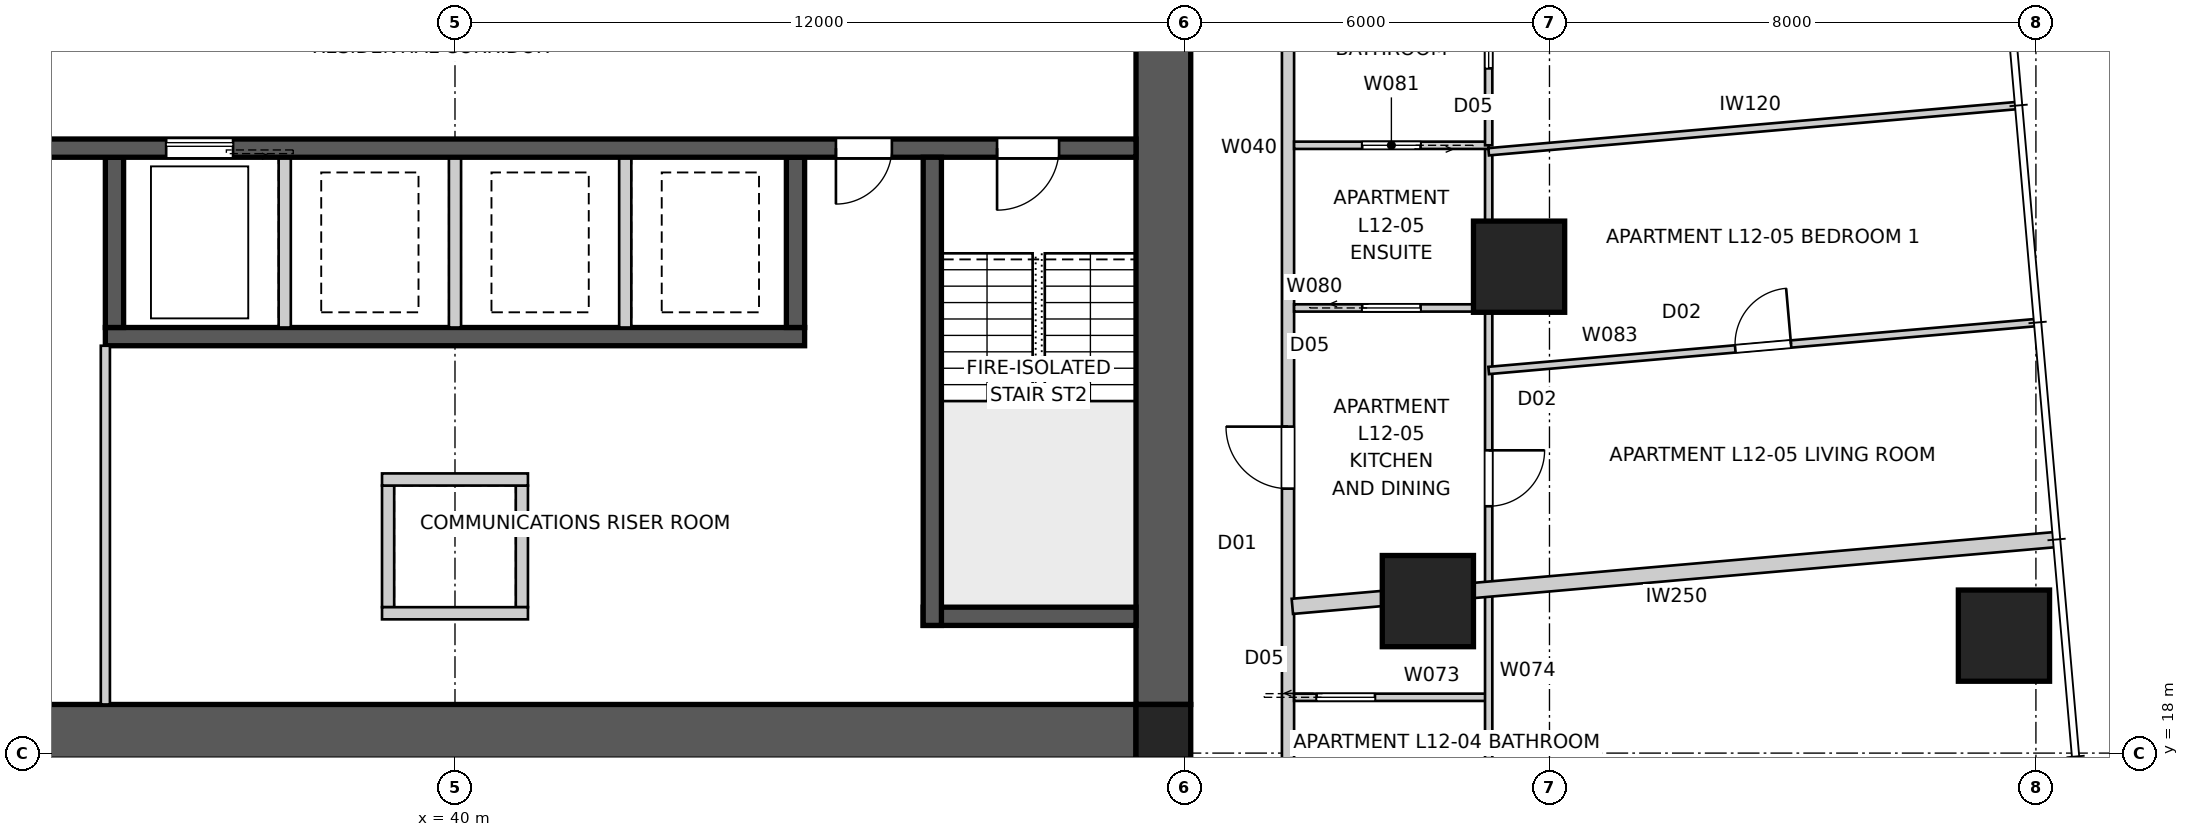
"""IFC4 building model, lengths in metres.
Left out: names, types, materials, properties, quantities, classifications, styles, units other than length and angle.
Written with IfcOpenShell. Run it as: python <this file> out.ifc"""

import sys

from ifc_helpers import new_model, si_unit, direction, frame, frame_2d, origin, origin_2d, place, context, subcontext, project, spatial, polyline, rectangle, outline, extrude, element, fill, save


model = new_model("IFC4")
c1 = context("Model", 3, precision=1e-05, world=origin(), true_north=direction((0.0, 1.0)))
c2 = subcontext(c1, "Body", "Model", "MODEL_VIEW")
j1 = project(units=[si_unit("LENGTHUNIT", "METRE"), si_unit("PLANEANGLEUNIT", "RADIAN")], contexts=[c1])
p1 = place(None, origin())
s1 = spatial("IfcSite", under=j1, at=p1, CompositionType="ELEMENT")
p2 = place(p1, origin())
s2 = spatial("IfcBuilding", under=s1, at=p2, CompositionType="ELEMENT")
p3 = place(p2, frame((0.0, 0.0, 47.2)))
s3 = spatial("IfcBuildingStorey", under=s2, at=p3, CompositionType="ELEMENT", Elevation=47.2)
p4 = place(p3, frame((51.2, 18.35, 0.0), z_axis=(0.0, 0.0, 1.0), x_axis=(-1.0, 0.0, 0.0)))
e1 = element("IfcWall", 1, at=p4, inside=s3, PredefinedType="SHEAR", context=c2, shape_type="SweptSolid", body=[
    extrude(outline(polyline([(0.0, -0.45), (22.4, -0.45), (22.4, -0.025), (22.85, -0.025), (22.85, 0.025), (22.4, 0.025), (22.4, 0.45), (0.0, 0.45), (0.0, 0.025), (-0.45, 0.025), (-0.45, -0.025), (0.0, -0.025), (0.0, -0.45)])), origin(), (0.0, 0.0, 1.0), 3.4),
])
p5 = place(p3, frame((51.65, 18.8, 0.0), z_axis=(0.0, 0.0, 1.0), x_axis=(0.0, 1.0, 0.0)))
e2 = element("IfcWall", 2, at=p5, inside=s3, PredefinedType="SHEAR", context=c2, shape_type="SweptSolid", body=[
    extrude(outline(polyline([(0.0, -0.45), (22.4, -0.45), (22.4, -0.025), (22.85, -0.025), (22.85, 0.025), (22.4, 0.025), (22.4, 0.45), (0.0, 0.45), (0.0, 0.025), (-0.45, 0.025), (-0.45, -0.025), (0.0, -0.025), (0.0, -0.45)])), origin(), (0.0, 0.0, 1.0), 3.4),
])
p6 = place(p5, frame((11.14, 0.0, 0.0)))
e3 = element("IfcOpeningElement", 3, at=p6, cuts=e2, PredefinedType="OPENING", context=c2, shape_type="SweptSolid", body=[
    extrude(rectangle(XDim=1.02, YDim=2.4, at=frame_2d((0.51, 1.2))), frame((0.0, 0.46, 0.0), z_axis=(0.0, -1.0, 0.0), x_axis=(1.0, 0.0, 0.0)), (0.0, 0.0, 1.0), 0.92),
])
p7 = place(p3, frame((51.2, 27.95, 0.0), z_axis=(0.0, 0.0, 1.0), x_axis=(-1.0, 0.0, 0.0)))
e4 = element("IfcWall", 4, at=p7, inside=s3, PredefinedType="SHEAR", context=c2, shape_type="SweptSolid", body=[
    extrude(rectangle(XDim=22.4, YDim=0.3, at=frame_2d((11.2, 0.0))), origin(), (0.0, 0.0, 1.0), 3.4),
])
p8 = place(p7, frame((19.04, 0.0, 0.0)))
e5 = element("IfcOpeningElement", 5, at=p8, cuts=e4, PredefinedType="OPENING", context=c2, shape_type="SweptSolid", body=[
    extrude(rectangle(XDim=0.92, YDim=2.1, at=frame_2d((0.46, 1.05))), frame((0.0, 0.16, 0.0), z_axis=(0.0, -1.0, 0.0), x_axis=(1.0, 0.0, 0.0)), (0.0, 0.0, 1.0), 0.32),
])
p9 = place(p7, frame((1.265, 0.0, 0.0)))
e6 = element("IfcOpeningElement", 6, at=p9, cuts=e4, PredefinedType="OPENING", context=c2, shape_type="SweptSolid", body=[
    extrude(rectangle(XDim=1.02, YDim=2.1, at=frame_2d((0.51, 1.05))), frame((0.0, 0.16, 0.0), z_axis=(0.0, -1.0, 0.0), x_axis=(1.0, 0.0, 0.0)), (0.0, 0.0, 1.0), 0.32),
])
p10 = place(p7, frame((4.015, 0.0, 0.0)))
e7 = element("IfcOpeningElement", 7, at=p10, cuts=e4, PredefinedType="OPENING", context=c2, shape_type="SweptSolid", body=[
    extrude(rectangle(XDim=0.92, YDim=2.1, at=frame_2d((0.46, 1.05))), frame((0.0, 0.16, 0.0), z_axis=(0.0, -1.0, 0.0), x_axis=(1.0, 0.0, 0.0)), (0.0, 0.0, 1.0), 0.32),
])
p11 = place(p7, frame((14.85, 0.0, 0.0)))
e8 = element("IfcOpeningElement", 8, at=p11, cuts=e4, PredefinedType="OPENING", context=c2, shape_type="SweptSolid", body=[
    extrude(rectangle(XDim=1.1, YDim=2.1, at=frame_2d((0.55, 1.05))), frame((0.0, 0.16, 0.0), z_axis=(0.0, -1.0, 0.0), x_axis=(1.0, 0.0, 0.0)), (0.0, 0.0, 1.0), 0.32),
])
p12 = place(p3, frame((45.75, 24.85, 0.0), z_axis=(0.0, 0.0, 1.0), x_axis=(-1.0, 0.0, 0.0)))
e9 = element("IfcWall", 9, at=p12, inside=s3, PredefinedType="SHEAR", context=c2, shape_type="SweptSolid", body=[
    extrude(rectangle(XDim=11.5, YDim=0.3, at=frame_2d((5.75, 0.0))), origin(), (0.0, 0.0, 1.0), 3.4),
])
p13 = place(p3, frame((45.6, 27.8, 0.0), z_axis=(0.0, 0.0, 1.0), x_axis=(0.0, -1.0, 0.0)))
e10 = element("IfcWall", 10, at=p13, inside=s3, PredefinedType="SHEAR", context=c2, shape_type="SweptSolid", body=[
    extrude(rectangle(XDim=2.8, YDim=0.3, at=frame_2d((1.4, 0.0))), origin(), (0.0, 0.0, 1.0), 3.4),
])
for number, where, z_axis, x_axis in (
    (11, (42.8, 27.8, 0.0), (0.0, 0.0, 1.0), (0.0, -1.0, 0.0)),
    (12, (40.0, 27.8, 0.0), (0.0, 0.0, 1.0), (0.0, -1.0, 0.0)),
    (13, (37.2, 27.8, 0.0), (0.0, 0.0, 1.0), (0.0, -1.0, 0.0)),
):
    element("IfcWall", number, at=place(p3, frame(where, z_axis=z_axis, x_axis=x_axis)), inside=s3, PredefinedType="SOLIDWALL", context=c2, shape_type="SweptSolid", body=[
        extrude(rectangle(XDim=2.8, YDim=0.2, at=frame_2d((1.4, 0.0))), origin(), (0.0, 0.0, 1.0), 3.4),
    ])
p14 = place(p3, frame((34.4, 27.8, 0.0), z_axis=(0.0, 0.0, 1.0), x_axis=(0.0, -1.0, 0.0)))
e14 = element("IfcWall", 14, at=p14, inside=s3, PredefinedType="SHEAR", context=c2, shape_type="SweptSolid", body=[
    extrude(rectangle(XDim=2.8, YDim=0.3, at=frame_2d((1.4, 0.0))), origin(), (0.0, 0.0, 1.0), 3.4),
])
p15 = place(p3, frame((47.85, 27.8, 0.0), z_axis=(0.0, 0.0, 1.0), x_axis=(0.0, -1.0, 0.0)))
e15 = element("IfcWall", 15, at=p15, inside=s3, PredefinedType="SHEAR", context=c2, shape_type="SweptSolid", body=[
    extrude(rectangle(XDim=7.7, YDim=0.3, at=frame_2d((3.85, 0.0))), origin(), (0.0, 0.0, 1.0), 3.4),
])
p16 = place(p3, frame((51.2, 20.25, 0.0), z_axis=(0.0, 0.0, 1.0), x_axis=(-1.0, 0.0, 0.0)))
e16 = element("IfcWall", 16, at=p16, inside=s3, PredefinedType="SHEAR", context=c2, shape_type="SweptSolid", body=[
    extrude(rectangle(XDim=3.5, YDim=0.3, at=frame_2d((1.75, 0.0))), origin(), (0.0, 0.0, 1.0), 3.4),
])
for number, where, z_axis, x_axis in (
    (17, (38.9, 22.4, 0.0), (0.0, 0.0, 1.0), (0.0, -1.0, 0.0)),
    (18, (41.1, 22.4, 0.0), (0.0, 0.0, 1.0), (0.0, -1.0, 0.0)),
):
    element("IfcWall", number, at=place(p3, frame(where, z_axis=z_axis, x_axis=x_axis)), inside=s3, PredefinedType="SOLIDWALL", context=c2, shape_type="SweptSolid", body=[
        extrude(rectangle(XDim=2.0, YDim=0.2, at=frame_2d((1.0, 0.0))), origin(), (0.0, 0.0, 1.0), 3.4),
    ])
for number, where, z_axis, x_axis in (
    (19, (38.8, 22.5, 0.0), (0.0, 0.0, 1.0), (1.0, 0.0, 0.0)),
    (20, (38.8, 20.3, 0.0), (0.0, 0.0, 1.0), (1.0, 0.0, 0.0)),
):
    element("IfcWall", number, at=place(p3, frame(where, z_axis=z_axis, x_axis=x_axis)), inside=s3, PredefinedType="SOLIDWALL", context=c2, shape_type="SweptSolid", body=[
        extrude(rectangle(XDim=2.4, YDim=0.2, at=frame_2d((1.2, 0.0))), origin(), (0.0, 0.0, 1.0), 3.4),
    ])
p17 = place(p3, frame((51.65, 18.35, 0.0), z_axis=(0.0, 0.0, 1.0), x_axis=(1.0, 0.0, 0.0)))
e21 = element("IfcColumn", 21, at=p17, inside=s3, PredefinedType="COLUMN", context=c2, shape_type="SweptSolid", body=[
    extrude(rectangle(XDim=0.9, YDim=0.9, at=origin_2d()), origin(), (0.0, 0.0, 1.0), 3.4),
])
p18 = place(p3, frame((65.474, 19.932, -0.15), z_axis=(0.0, 0.0, 1.0), x_axis=(1.0, 0.0, 0.0)))
e22 = element("IfcColumn", 22, at=p18, inside=s3, PredefinedType="COLUMN", context=c2, shape_type="SweptSolid", body=[
    extrude(rectangle(XDim=1.5, YDim=1.5, at=origin_2d()), origin(), (0.0, 0.0, 1.0), 3.55),
])
for number, where, z_axis, x_axis in (
    (23, (57.5, 26.0, 0.0), (0.0, 0.0, 1.0), (1.0, 0.0, 0.0)),
    (24, (56.0, 20.5, 0.0), (0.0, 0.0, 1.0), (1.0, 0.0, 0.0)),
):
    element("IfcColumn", number, at=place(p3, frame(where, z_axis=z_axis, x_axis=x_axis)), inside=s3, PredefinedType="COLUMN", context=c2, shape_type="SweptSolid", body=[
        extrude(rectangle(XDim=1.5, YDim=1.5, at=origin_2d()), origin(), (0.0, 0.0, 1.0), 3.4),
    ])
p19 = place(p3, frame((53.7, 15.5, 0.0), z_axis=(0.0, 0.0, 1.0), x_axis=(0.0, 1.0, 0.0)))
e25 = element("IfcWall", 25, at=p19, inside=s3, PredefinedType="PARTITIONING", context=c2, shape_type="SweptSolid", body=[
    extrude(rectangle(XDim=28.2, YDim=0.2, at=frame_2d((14.1, 0.0))), origin(), (0.0, 0.0, 1.0), 3.25),
])
p20 = place(p19, frame((23.161, 0.0, 0.0)))
e26 = element("IfcOpeningElement", 26, at=p20, cuts=e25, PredefinedType="OPENING", context=c2, shape_type="SweptSolid", body=[
    extrude(rectangle(XDim=1.02, YDim=2.34, at=frame_2d((0.51, 1.17))), frame((0.0, 0.11, 0.0), z_axis=(0.0, -1.0, 0.0), x_axis=(1.0, 0.0, 0.0)), (0.0, 0.0, 1.0), 0.22),
])
p21 = place(p19, frame((6.85, 0.0, 0.0)))
e27 = element("IfcOpeningElement", 27, at=p21, cuts=e25, PredefinedType="OPENING", context=c2, shape_type="SweptSolid", body=[
    extrude(rectangle(XDim=1.02, YDim=2.34, at=frame_2d((0.51, 1.17))), frame((0.0, 0.11, 0.0), z_axis=(0.0, -1.0, 0.0), x_axis=(1.0, 0.0, 0.0)), (0.0, 0.0, 1.0), 0.22),
])
p22 = place(p3, frame((66.34, 21.513, 0.0), z_axis=(0.0, 0.0, 1.0), x_axis=(-0.996194851608, -0.087153988028, 0.0)))
e28 = element("IfcWall", 28, at=p22, inside=s3, PredefinedType="PARTITIONING", context=c2, shape_type="SweptSolid", body=[
    extrude(rectangle(XDim=12.617, YDim=0.25, at=frame_2d((6.309, 0.0))), origin(), (0.0, 0.0, 1.0), 3.25),
])
p23 = place(p3, frame((34.25, 18.8, 0.0), z_axis=(0.0, 0.0, 1.0), x_axis=(0.0, 1.0, 0.0)))
e29 = element("IfcWall", 29, at=p23, inside=s3, PredefinedType="SOLIDWALL", context=c2, shape_type="SweptSolid", body=[
    extrude(rectangle(XDim=5.9, YDim=0.15, at=frame_2d((2.95, 0.0))), origin(), (0.0, 0.0, 1.0), 3.25),
])
p24 = place(p3, frame((53.8, 18.918, 0.0), z_axis=(0.0, 0.0, 1.0), x_axis=(1.0, 0.0, 0.0)))
e30 = element("IfcWall", 30, at=p24, inside=s3, PredefinedType="PARTITIONING", context=c2, shape_type="SweptSolid", body=[
    extrude(rectangle(XDim=3.2, YDim=0.12, at=frame_2d((1.6, 0.0))), origin(), (0.0, 0.0, 1.0), 3.25),
])
p25 = place(p24, frame((0.37, 0.0, 0.0)))
e31 = element("IfcOpeningElement", 31, at=p25, cuts=e30, PredefinedType="OPENING", context=c2, shape_type="SweptSolid", body=[
    extrude(rectangle(XDim=0.96, YDim=2.1, at=frame_2d((0.48, 1.05))), frame((0.0, 0.07, 0.0), z_axis=(0.0, -1.0, 0.0), x_axis=(1.0, 0.0, 0.0)), (0.0, 0.0, 1.0), 0.14),
])
p26 = place(p3, frame((57.0, 27.94, 0.0), z_axis=(0.0, 0.0, 1.0), x_axis=(0.0, -1.0, 0.0)))
e32 = element("IfcWall", 32, at=p26, inside=s3, PredefinedType="PARTITIONING", context=c2, shape_type="SweptSolid", body=[
    extrude(rectangle(XDim=14.94, YDim=0.12, at=frame_2d((7.47, 0.0))), origin(), (0.0, 0.0, 1.0), 2.55),
])
p27 = place(p26, frame((4.961, 0.0, 0.0)))
e33 = element("IfcOpeningElement", 33, at=p27, cuts=e32, PredefinedType="OPENING", context=c2, shape_type="SweptSolid", body=[
    extrude(rectangle(XDim=0.92, YDim=2.34, at=frame_2d((0.46, 1.17))), frame((0.0, 0.07, 0.0), z_axis=(0.0, -1.0, 0.0), x_axis=(1.0, 0.0, 0.0)), (0.0, 0.0, 1.0), 0.14),
])
p28 = place(p26, frame((11.296, 0.0, 0.0)))
e34 = element("IfcOpeningElement", 34, at=p28, cuts=e32, PredefinedType="OPENING", context=c2, shape_type="SweptSolid", body=[
    extrude(rectangle(XDim=0.92, YDim=2.34, at=frame_2d((0.46, 1.17))), frame((0.0, 0.07, 0.0), z_axis=(0.0, -1.0, 0.0), x_axis=(1.0, 0.0, 0.0)), (0.0, 0.0, 1.0), 0.14),
])
p29 = place(p3, frame((53.8, 25.322, 0.0), z_axis=(0.0, 0.0, 1.0), x_axis=(1.0, 0.0, 0.0)))
e35 = element("IfcWall", 35, at=p29, inside=s3, PredefinedType="PARTITIONING", context=c2, shape_type="SweptSolid", body=[
    extrude(rectangle(XDim=3.2, YDim=0.12, at=frame_2d((1.6, 0.0))), origin(), (0.0, 0.0, 1.0), 3.25),
])
p30 = place(p29, frame((1.12, 0.0, 0.0)))
e36 = element("IfcOpeningElement", 36, at=p30, cuts=e35, PredefinedType="OPENING", context=c2, shape_type="SweptSolid", body=[
    extrude(rectangle(XDim=0.96, YDim=2.1, at=frame_2d((0.48, 1.05))), frame((0.0, 0.07, 0.0), z_axis=(0.0, -1.0, 0.0), x_axis=(1.0, 0.0, 0.0)), (0.0, 0.0, 1.0), 0.14),
])
p31 = place(p3, frame((57.0, 27.997, 0.0), z_axis=(0.0, 0.0, 1.0), x_axis=(-1.0, 0.0, 0.0)))
e37 = element("IfcWall", 37, at=p31, inside=s3, PredefinedType="PARTITIONING", context=c2, shape_type="SweptSolid", body=[
    extrude(rectangle(XDim=3.2, YDim=0.12, at=frame_2d((1.6, 0.0))), origin(), (0.0, 0.0, 1.0), 3.25),
])
p32 = place(p31, frame((1.12, 0.0, 0.0)))
e38 = element("IfcOpeningElement", 38, at=p32, cuts=e37, PredefinedType="OPENING", context=c2, shape_type="SweptSolid", body=[
    extrude(rectangle(XDim=0.96, YDim=2.1, at=frame_2d((0.48, 1.05))), frame((0.0, 0.07, 0.0), z_axis=(0.0, -1.0, 0.0), x_axis=(1.0, 0.0, 0.0)), (0.0, 0.0, 1.0), 0.14),
])
p33 = place(p3, frame((57.0, 47.0, 0.0), z_axis=(0.0, 0.0, 1.0), x_axis=(0.0, -1.0, 0.0)))
e39 = element("IfcWall", 39, at=p33, inside=s3, PredefinedType="PARTITIONING", context=c2, shape_type="SweptSolid", body=[
    extrude(rectangle(XDim=19.003, YDim=0.12, at=frame_2d((9.501, 0.0))), origin(), (0.0, 0.0, 1.0), 2.55),
])
p34 = place(p33, frame((5.785, 0.0, 0.0)))
e40 = element("IfcOpeningElement", 40, at=p34, cuts=e39, PredefinedType="OPENING", context=c2, shape_type="SweptSolid", body=[
    extrude(rectangle(XDim=0.92, YDim=2.34, at=frame_2d((0.46, 1.17))), frame((0.0, 0.07, 0.0), z_axis=(0.0, -1.0, 0.0), x_axis=(1.0, 0.0, 0.0)), (0.0, 0.0, 1.0), 0.14),
])
p35 = place(p33, frame((8.994, 0.0, 0.0)))
e41 = element("IfcOpeningElement", 41, at=p35, cuts=e39, PredefinedType="OPENING", context=c2, shape_type="SweptSolid", body=[
    extrude(rectangle(XDim=0.92, YDim=2.34, at=frame_2d((0.46, 1.17))), frame((0.0, 0.07, 0.0), z_axis=(0.0, -1.0, 0.0), x_axis=(1.0, 0.0, 0.0)), (0.0, 0.0, 1.0), 0.14),
])
p36 = place(p33, frame((2.418, 0.0, 0.0)))
e42 = element("IfcOpeningElement", 42, at=p36, cuts=e39, PredefinedType="OPENING", context=c2, shape_type="SweptSolid", body=[
    extrude(rectangle(XDim=0.96, YDim=2.1, at=frame_2d((0.48, 1.05))), frame((0.0, 0.07, 0.0), z_axis=(0.0, -1.0, 0.0), x_axis=(1.0, 0.0, 0.0)), (0.0, 0.0, 1.0), 0.14),
])
p37 = place(p33, frame((14.093, 0.0, 0.0)))
e43 = element("IfcOpeningElement", 43, at=p37, cuts=e39, PredefinedType="OPENING", context=c2, shape_type="SweptSolid", body=[
    extrude(rectangle(XDim=0.96, YDim=2.1, at=frame_2d((0.48, 1.05))), frame((0.0, 0.07, 0.0), z_axis=(0.0, -1.0, 0.0), x_axis=(1.0, 0.0, 0.0)), (0.0, 0.0, 1.0), 0.14),
])
p38 = place(p33, frame((16.778, 0.0, 0.0)))
e44 = element("IfcOpeningElement", 44, at=p38, cuts=e39, PredefinedType="OPENING", context=c2, shape_type="SweptSolid", body=[
    extrude(rectangle(XDim=0.96, YDim=2.1, at=frame_2d((0.48, 1.05))), frame((0.0, 0.07, 0.0), z_axis=(0.0, -1.0, 0.0), x_axis=(1.0, 0.0, 0.0)), (0.0, 0.0, 1.0), 0.14),
])
p39 = place(p3, frame((57.0, 24.293, 0.0), z_axis=(0.0, 0.0, 1.0), x_axis=(0.996194246178, 0.087160907995, 0.0)))
e45 = element("IfcWall", 45, at=p39, inside=s3, PredefinedType="PARTITIONING", context=c2, shape_type="SweptSolid", body=[
    extrude(rectangle(XDim=9.022, YDim=0.12, at=frame_2d((4.511, 0.0))), origin(), (0.0, 0.0, 1.0), 3.25),
])
p40 = place(p39, frame((4.071, 0.0, 0.0)))
e46 = element("IfcOpeningElement", 46, at=p40, cuts=e45, PredefinedType="OPENING", context=c2, shape_type="SweptSolid", body=[
    extrude(rectangle(XDim=0.92, YDim=2.34, at=frame_2d((0.46, 1.17))), frame((0.0, 0.07, 0.0), z_axis=(0.0, -1.0, 0.0), x_axis=(1.0, 0.0, 0.0)), (0.0, 0.0, 1.0), 0.14),
])
p41 = place(p3, frame((57.0, 27.89, 0.0), z_axis=(0.0, 0.0, 1.0), x_axis=(0.996194478193, 0.087158256162, 0.0)))
e47 = element("IfcWall", 47, at=p41, inside=s3, PredefinedType="PARTITIONING", context=c2, shape_type="SweptSolid", body=[
    extrude(rectangle(XDim=8.709, YDim=0.12, at=frame_2d((4.354, 0.0))), origin(), (0.0, 0.0, 1.0), 3.25),
])
p42 = place(p9, origin())
e48 = element("IfcDoor", 48, at=p42, inside=s3, OperationType="SINGLE_SWING_RIGHT", PredefinedType="DOOR", context=c2, shape_type="SweptSolid", body=[
    extrude(rectangle(XDim=1.02, YDim=2.1, at=frame_2d((0.51, 1.05))), frame((0.0, 0.025, 0.0), z_axis=(0.0, -1.0, 0.0), x_axis=(1.0, 0.0, 0.0)), (0.0, 0.0, 1.0), 0.05),
])
fill(e6, e48)
p43 = place(p10, origin())
e49 = element("IfcDoor", 49, at=p43, inside=s3, OperationType="SINGLE_SWING_RIGHT", PredefinedType="DOOR", context=c2, shape_type="SweptSolid", body=[
    extrude(rectangle(XDim=0.92, YDim=2.1, at=frame_2d((0.46, 1.05))), frame((0.0, 0.025, 0.0), z_axis=(0.0, -1.0, 0.0), x_axis=(1.0, 0.0, 0.0)), (0.0, 0.0, 1.0), 0.05),
])
fill(e7, e49)
p44 = place(p21, origin())
e50 = element("IfcDoor", 50, at=p44, inside=s3, OperationType="SINGLE_SWING_RIGHT", PredefinedType="DOOR", context=c2, shape_type="SweptSolid", body=[
    extrude(rectangle(XDim=1.02, YDim=2.34, at=frame_2d((0.51, 1.17))), frame((0.0, 0.025, 0.0), z_axis=(0.0, -1.0, 0.0), x_axis=(1.0, 0.0, 0.0)), (0.0, 0.0, 1.0), 0.05),
])
fill(e27, e50)
p45 = place(p27, origin())
e51 = element("IfcDoor", 51, at=p45, inside=s3, OperationType="SINGLE_SWING_LEFT", PredefinedType="DOOR", context=c2, shape_type="SweptSolid", body=[
    extrude(rectangle(XDim=0.92, YDim=2.34, at=frame_2d((0.46, 1.17))), frame((0.0, 0.025, 0.0), z_axis=(0.0, -1.0, 0.0), x_axis=(1.0, 0.0, 0.0)), (0.0, 0.0, 1.0), 0.05),
])
fill(e33, e51)
p46 = place(p30, origin())
e52 = element("IfcDoor", 52, at=p46, inside=s3, OperationType="SLIDING_TO_LEFT", PredefinedType="DOOR", context=c2, shape_type="SweptSolid", body=[
    extrude(rectangle(XDim=0.96, YDim=2.1, at=frame_2d((0.48, 1.05))), frame((0.0, 0.025, 0.0), z_axis=(0.0, -1.0, 0.0), x_axis=(1.0, 0.0, 0.0)), (0.0, 0.0, 1.0), 0.05),
])
fill(e36, e52)
p47 = place(p25, origin())
e53 = element("IfcDoor", 53, at=p47, inside=s3, OperationType="SLIDING_TO_LEFT", PredefinedType="DOOR", context=c2, shape_type="SweptSolid", body=[
    extrude(rectangle(XDim=0.96, YDim=2.1, at=frame_2d((0.48, 1.05))), frame((0.0, 0.025, 0.0), z_axis=(0.0, -1.0, 0.0), x_axis=(1.0, 0.0, 0.0)), (0.0, 0.0, 1.0), 0.05),
])
fill(e31, e53)
p48 = place(p40, origin())
e54 = element("IfcDoor", 54, at=p48, inside=s3, OperationType="SINGLE_SWING_RIGHT", PredefinedType="DOOR", context=c2, shape_type="SweptSolid", body=[
    extrude(rectangle(XDim=0.92, YDim=2.34, at=frame_2d((0.46, 1.17))), frame((0.0, 0.025, 0.0), z_axis=(0.0, -1.0, 0.0), x_axis=(1.0, 0.0, 0.0)), (0.0, 0.0, 1.0), 0.05),
])
fill(e46, e54)
p49 = place(p32, origin())
e55 = element("IfcDoor", 55, at=p49, inside=s3, OperationType="SLIDING_TO_LEFT", PredefinedType="DOOR", context=c2, shape_type="SweptSolid", body=[
    extrude(rectangle(XDim=0.96, YDim=2.1, at=frame_2d((0.48, 1.05))), frame((0.0, 0.025, 0.0), z_axis=(0.0, -1.0, 0.0), x_axis=(1.0, 0.0, 0.0)), (0.0, 0.0, 1.0), 0.05),
])
fill(e38, e55)
p50 = place(p38, origin())
e56 = element("IfcDoor", 56, at=p50, inside=s3, OperationType="SLIDING_TO_LEFT", PredefinedType="DOOR", context=c2, shape_type="SweptSolid", body=[
    extrude(rectangle(XDim=0.96, YDim=2.1, at=frame_2d((0.48, 1.05))), frame((0.0, 0.025, 0.0), z_axis=(0.0, -1.0, 0.0), x_axis=(1.0, 0.0, 0.0)), (0.0, 0.0, 1.0), 0.05),
])
fill(e44, e56)
p51 = place(p11, origin())
e57 = element("IfcDoor", 57, at=p51, inside=s3, OperationType="SLIDING_TO_LEFT", PredefinedType="DOOR", context=c2, shape_type="SweptSolid", body=[
    extrude(rectangle(XDim=1.1, YDim=2.1, at=frame_2d((0.55, 1.05))), frame((0.0, 0.025, 0.0), z_axis=(0.0, -1.0, 0.0), x_axis=(1.0, 0.0, 0.0)), (0.0, 0.0, 1.0), 0.05),
])
fill(e8, e57)
save(model, sys.argv[1])
